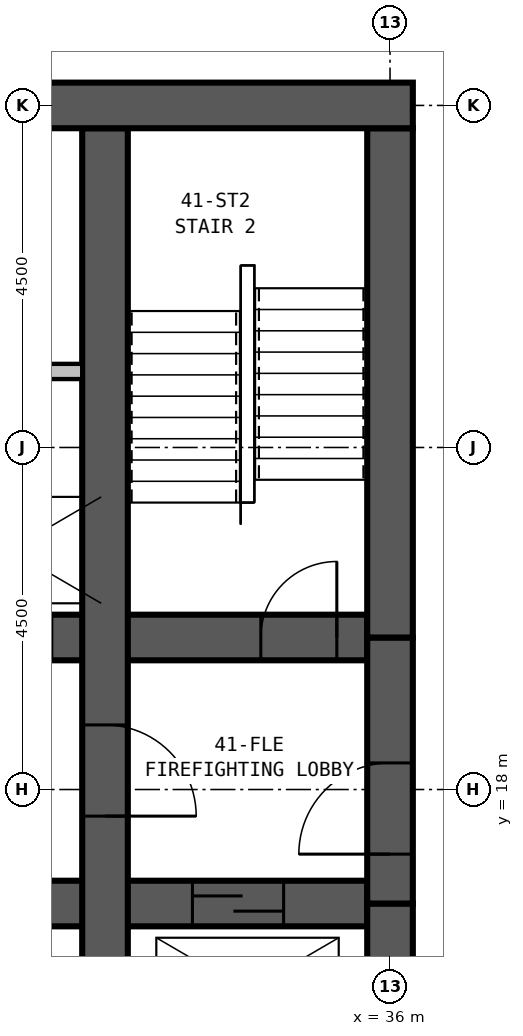
"""IFC4 building model, lengths in metres.
Left out: names, types, materials, properties, quantities, classifications, styles, units other than length and angle.
Written with IfcOpenShell. Run it as: python <this file> out.ifc"""

import sys

from ifc_helpers import new_model, si_unit, direction, frame, frame_2d, origin, place, context, subcontext, project, spatial, rectangle, extrude, element, fill, save


model = new_model("IFC4")
c1 = context("Model", 3, precision=1e-05, world=origin(), true_north=direction((0.0, 1.0)))
c2 = subcontext(c1, "Body", "Model", "MODEL_VIEW")
j1 = project(units=[si_unit("LENGTHUNIT", "METRE"), si_unit("PLANEANGLEUNIT", "RADIAN")], contexts=[c1])
p1 = place(None, origin())
s1 = spatial("IfcSite", under=j1, at=p1, CompositionType="ELEMENT")
p2 = place(p1, origin())
s2 = spatial("IfcBuilding", under=s1, at=p2, CompositionType="ELEMENT")
p3 = place(p2, frame((0.0, 0.0, 162.4)))
s3 = spatial("IfcBuildingStorey", under=s2, at=p3, CompositionType="ELEMENT", Elevation=162.4)
p4 = place(p3, frame((36.3, 27.0, 0.0), z_axis=(0.0, 0.0, 1.0), x_axis=(-1.0, 0.0, 0.0)))
e1 = element("IfcWall", 1, at=p4, inside=s3, PredefinedType="SHEAR", context=c2, shape_type="SweptSolid", body=[
    extrude(rectangle(XDim=23.1, YDim=0.6, at=frame_2d((11.55, 0.0))), origin(), (0.0, 0.0, 1.0), 3.5),
])
p5 = place(p4, frame((17.05, 0.0, 0.0)))
e2 = element("IfcOpeningElement", 2, at=p5, cuts=e1, PredefinedType="OPENING", context=c2, shape_type="SweptSolid", body=[
    extrude(rectangle(XDim=1.0, YDim=2.1, at=frame_2d((0.5, 1.05))), frame((0.0, 0.31, 0.0), z_axis=(0.0, -1.0, 0.0), x_axis=(1.0, 0.0, 0.0)), (0.0, 0.0, 1.0), 0.62),
])
p6 = place(p4, frame((12.05, 0.0, 0.0)))
e3 = element("IfcOpeningElement", 3, at=p6, cuts=e1, PredefinedType="OPENING", context=c2, shape_type="SweptSolid", body=[
    extrude(rectangle(XDim=1.0, YDim=2.1, at=frame_2d((0.5, 1.05))), frame((0.0, 0.31, 0.0), z_axis=(0.0, -1.0, 0.0), x_axis=(1.0, 0.0, 0.0)), (0.0, 0.0, 1.0), 0.62),
])
p7 = place(p4, frame((7.05, 0.0, 0.0)))
e4 = element("IfcOpeningElement", 4, at=p7, cuts=e1, PredefinedType="OPENING", context=c2, shape_type="SweptSolid", body=[
    extrude(rectangle(XDim=1.0, YDim=2.1, at=frame_2d((0.5, 1.05))), frame((0.0, 0.31, 0.0), z_axis=(0.0, -1.0, 0.0), x_axis=(1.0, 0.0, 0.0)), (0.0, 0.0, 1.0), 0.62),
])
p8 = place(p3, frame((32.25, 13.8, 0.0), z_axis=(0.0, 0.0, 1.0), x_axis=(0.0, 1.0, 0.0)))
e5 = element("IfcWall", 5, at=p8, inside=s3, PredefinedType="SHEAR", context=c2, shape_type="SweptSolid", body=[
    extrude(rectangle(XDim=12.9, YDim=0.6, at=frame_2d((6.45, 0.0))), origin(), (0.0, 0.0, 1.0), 3.5),
])
p9 = place(p8, frame((5.05, 0.0, 0.0), z_axis=(0.0, 0.0, 1.0), x_axis=(-1.0, 0.0, 0.0)))
e6 = element("IfcOpeningElement", 6, at=p9, cuts=e5, PredefinedType="OPENING", context=c2, shape_type="SweptSolid", body=[
    extrude(rectangle(XDim=1.2, YDim=2.1, at=frame_2d((0.6, 1.05))), frame((0.0, 0.31, 0.0), z_axis=(0.0, -1.0, 0.0), x_axis=(1.0, 0.0, 0.0)), (0.0, 0.0, 1.0), 0.62),
])
p10 = place(p3, frame((13.8, 16.5, 0.0), z_axis=(0.0, 0.0, 1.0), x_axis=(1.0, 0.0, 0.0)))
e7 = element("IfcWall", 7, at=p10, inside=s3, PredefinedType="SHEAR", context=c2, shape_type="SweptSolid", body=[
    extrude(rectangle(XDim=21.9, YDim=0.6, at=frame_2d((10.95, 0.0))), origin(), (0.0, 0.0, 1.0), 3.5),
])
p11 = place(p10, frame((5.75, 0.0, 0.0), z_axis=(0.0, 0.0, 1.0), x_axis=(-1.0, 0.0, 0.0)))
e8 = element("IfcOpeningElement", 8, at=p11, cuts=e7, PredefinedType="OPENING", context=c2, shape_type="SweptSolid", body=[
    extrude(rectangle(XDim=1.0, YDim=2.1, at=frame_2d((0.5, 1.05))), frame((0.0, 0.31, 0.0), z_axis=(0.0, -1.0, 0.0), x_axis=(1.0, 0.0, 0.0)), (0.0, 0.0, 1.0), 0.62),
])
p12 = place(p10, frame((10.2, 0.0, 0.0), z_axis=(0.0, 0.0, 1.0), x_axis=(-1.0, 0.0, 0.0)))
e9 = element("IfcOpeningElement", 9, at=p12, cuts=e7, PredefinedType="OPENING", context=c2, shape_type="SweptSolid", body=[
    extrude(rectangle(XDim=1.0, YDim=2.1, at=frame_2d((0.5, 1.05))), frame((0.0, 0.31, 0.0), z_axis=(0.0, -1.0, 0.0), x_axis=(1.0, 0.0, 0.0)), (0.0, 0.0, 1.0), 0.62),
])
p13 = place(p10, frame((12.7, 0.0, 0.0), z_axis=(0.0, 0.0, 1.0), x_axis=(-1.0, 0.0, 0.0)))
e10 = element("IfcOpeningElement", 10, at=p13, cuts=e7, PredefinedType="OPENING", context=c2, shape_type="SweptSolid", body=[
    extrude(rectangle(XDim=1.0, YDim=2.1, at=frame_2d((0.5, 1.05))), frame((0.0, 0.31, 0.0), z_axis=(0.0, -1.0, 0.0), x_axis=(1.0, 0.0, 0.0)), (0.0, 0.0, 1.0), 0.62),
])
p14 = place(p10, frame((17.15, 0.0, 0.0), z_axis=(0.0, 0.0, 1.0), x_axis=(-1.0, 0.0, 0.0)))
e11 = element("IfcOpeningElement", 11, at=p14, cuts=e7, PredefinedType="OPENING", context=c2, shape_type="SweptSolid", body=[
    extrude(rectangle(XDim=1.0, YDim=2.1, at=frame_2d((0.5, 1.05))), frame((0.0, 0.31, 0.0), z_axis=(0.0, -1.0, 0.0), x_axis=(1.0, 0.0, 0.0)), (0.0, 0.0, 1.0), 0.62),
])
p15 = place(p10, frame((0.6, 0.0, 0.0)))
e12 = element("IfcOpeningElement", 12, at=p15, cuts=e7, PredefinedType="OPENING", context=c2, shape_type="SweptSolid", body=[
    extrude(rectangle(XDim=1.2, YDim=2.1, at=frame_2d((0.6, 1.05))), frame((0.0, 0.31, 0.0), z_axis=(0.0, -1.0, 0.0), x_axis=(1.0, 0.0, 0.0)), (0.0, 0.0, 1.0), 0.62),
])
p16 = place(p10, frame((19.6, 0.0, 0.0)))
e13 = element("IfcOpeningElement", 13, at=p16, cuts=e7, PredefinedType="OPENING", context=c2, shape_type="SweptSolid", body=[
    extrude(rectangle(XDim=1.2, YDim=2.1, at=frame_2d((0.6, 1.05))), frame((0.0, 0.31, 0.0), z_axis=(0.0, -1.0, 0.0), x_axis=(1.0, 0.0, 0.0)), (0.0, 0.0, 1.0), 0.62),
])
p17 = place(p3, frame((13.8, 20.0, 0.0), z_axis=(0.0, 0.0, 1.0), x_axis=(1.0, 0.0, 0.0)))
e14 = element("IfcWall", 14, at=p17, inside=s3, PredefinedType="SHEAR", context=c2, shape_type="SweptSolid", body=[
    extrude(rectangle(XDim=21.9, YDim=0.6, at=frame_2d((10.95, 0.0))), origin(), (0.0, 0.0, 1.0), 3.5),
])
p18 = place(p17, frame((0.5, 0.0, 0.0)))
e15 = element("IfcOpeningElement", 15, at=p18, cuts=e14, PredefinedType="OPENING", context=c2, shape_type="SweptSolid", body=[
    extrude(rectangle(XDim=1.0, YDim=2.1, at=frame_2d((0.5, 1.05))), frame((0.0, 0.31, 0.0), z_axis=(0.0, -1.0, 0.0), x_axis=(1.0, 0.0, 0.0)), (0.0, 0.0, 1.0), 0.62),
])
p19 = place(p17, frame((20.5, 0.0, 0.0)))
e16 = element("IfcOpeningElement", 16, at=p19, cuts=e14, PredefinedType="OPENING", context=c2, shape_type="SweptSolid", body=[
    extrude(rectangle(XDim=1.0, YDim=2.1, at=frame_2d((0.5, 1.05))), frame((0.0, 0.31, 0.0), z_axis=(0.0, -1.0, 0.0), x_axis=(1.0, 0.0, 0.0)), (0.0, 0.0, 1.0), 0.62),
])
p20 = place(p17, frame((9.15, 0.0, 0.0)))
e17 = element("IfcOpeningElement", 17, at=p20, cuts=e14, PredefinedType="OPENING", context=c2, shape_type="SweptSolid", body=[
    extrude(rectangle(XDim=1.1, YDim=2.1, at=frame_2d((0.55, 1.05))), frame((0.0, 0.31, 0.0), z_axis=(0.0, -1.0, 0.0), x_axis=(1.0, 0.0, 0.0)), (0.0, 0.0, 1.0), 0.62),
])
p21 = place(p17, frame((11.65, 0.0, 0.0)))
e18 = element("IfcOpeningElement", 18, at=p21, cuts=e14, PredefinedType="OPENING", context=c2, shape_type="SweptSolid", body=[
    extrude(rectangle(XDim=1.1, YDim=2.1, at=frame_2d((0.55, 1.05))), frame((0.0, 0.31, 0.0), z_axis=(0.0, -1.0, 0.0), x_axis=(1.0, 0.0, 0.0)), (0.0, 0.0, 1.0), 0.62),
])
p22 = place(p17, frame((14.15, 0.0, 0.0)))
e19 = element("IfcOpeningElement", 19, at=p22, cuts=e14, PredefinedType="OPENING", context=c2, shape_type="SweptSolid", body=[
    extrude(rectangle(XDim=1.1, YDim=2.1, at=frame_2d((0.55, 1.05))), frame((0.0, 0.31, 0.0), z_axis=(0.0, -1.0, 0.0), x_axis=(1.0, 0.0, 0.0)), (0.0, 0.0, 1.0), 0.62),
])
p23 = place(p17, frame((16.65, 0.0, 0.0)))
e20 = element("IfcOpeningElement", 20, at=p23, cuts=e14, PredefinedType="OPENING", context=c2, shape_type="SweptSolid", body=[
    extrude(rectangle(XDim=1.1, YDim=2.1, at=frame_2d((0.55, 1.05))), frame((0.0, 0.31, 0.0), z_axis=(0.0, -1.0, 0.0), x_axis=(1.0, 0.0, 0.0)), (0.0, 0.0, 1.0), 0.62),
])
p24 = place(p17, frame((4.75, 0.0, 0.0)))
e21 = element("IfcOpeningElement", 21, at=p24, cuts=e14, PredefinedType="OPENING", context=c2, shape_type="SweptSolid", body=[
    extrude(rectangle(XDim=1.0, YDim=2.1, at=frame_2d((0.5, 1.05))), frame((0.0, 0.31, 0.0), z_axis=(0.0, -1.0, 0.0), x_axis=(1.0, 0.0, 0.0)), (0.0, 0.0, 1.0), 0.62),
])
p25 = place(p17, frame((6.7, 0.0, 0.0)))
e22 = element("IfcOpeningElement", 22, at=p25, cuts=e14, PredefinedType="OPENING", context=c2, shape_type="SweptSolid", body=[
    extrude(rectangle(XDim=1.0, YDim=2.1, at=frame_2d((0.5, 1.05))), frame((0.0, 0.31, 0.0), z_axis=(0.0, -1.0, 0.0), x_axis=(1.0, 0.0, 0.0)), (0.0, 0.0, 1.0), 0.62),
])
p26 = place(p3, frame((36.0, 13.8, 0.0), z_axis=(0.0, 0.0, 1.0), x_axis=(0.0, 1.0, 0.0)))
e23 = element("IfcWall", 23, at=p26, inside=s3, PredefinedType="SHEAR", context=c2, shape_type="SweptSolid", body=[
    extrude(rectangle(XDim=2.7, YDim=0.6, at=frame_2d((1.35, 0.0))), origin(), (0.0, 0.0, 1.0), 3.5),
])
p27 = place(p3, frame((36.0, 16.5, 0.0), z_axis=(0.0, 0.0, 1.0), x_axis=(0.0, 1.0, 0.0)))
e24 = element("IfcWall", 24, at=p27, inside=s3, PredefinedType="SHEAR", context=c2, shape_type="SweptSolid", body=[
    extrude(rectangle(XDim=3.5, YDim=0.6, at=frame_2d((1.75, 0.0))), origin(), (0.0, 0.0, 1.0), 3.5),
])
p28 = place(p27, frame((0.65, 0.0, 0.0)))
e25 = element("IfcOpeningElement", 25, at=p28, cuts=e24, PredefinedType="OPENING", context=c2, shape_type="SweptSolid", body=[
    extrude(rectangle(XDim=1.2, YDim=2.1, at=frame_2d((0.6, 1.05))), frame((0.0, 0.31, 0.0), z_axis=(0.0, -1.0, 0.0), x_axis=(1.0, 0.0, 0.0)), (0.0, 0.0, 1.0), 0.62),
])
p29 = place(p3, frame((36.0, 20.0, 0.0), z_axis=(0.0, 0.0, 1.0), x_axis=(0.0, 1.0, 0.0)))
e26 = element("IfcWall", 26, at=p29, inside=s3, PredefinedType="SHEAR", context=c2, shape_type="SweptSolid", body=[
    extrude(rectangle(XDim=6.7, YDim=0.6, at=frame_2d((3.35, 0.0))), origin(), (0.0, 0.0, 1.0), 3.5),
])
p30 = place(p3, frame((17.55, 23.5, 0.0), z_axis=(0.0, 0.0, 1.0), x_axis=(1.0, 0.0, 0.0)))
e27 = element("IfcWall", 27, at=p30, inside=s3, PredefinedType="PARTITIONING", context=c2, shape_type="SweptSolid", body=[
    extrude(rectangle(XDim=14.4, YDim=0.2, at=frame_2d((7.2, 0.0))), origin(), (0.0, 0.0, 1.0), 3.25),
])
p31 = place(p28, origin())
e28 = element("IfcDoor", 28, at=p31, inside=s3, OperationType="SINGLE_SWING_LEFT", PredefinedType="DOOR", context=c2, shape_type="SweptSolid", body=[
    extrude(rectangle(XDim=1.2, YDim=2.1, at=frame_2d((0.6, 1.05))), frame((0.0, 0.3, 0.0), z_axis=(0.0, -1.0, 0.0), x_axis=(1.0, 0.0, 0.0)), (0.0, 0.0, 1.0), 0.6),
])
fill(e25, e28)
p32 = place(p9, origin())
e29 = element("IfcDoor", 29, at=p32, inside=s3, OperationType="SINGLE_SWING_RIGHT", PredefinedType="DOOR", context=c2, shape_type="SweptSolid", body=[
    extrude(rectangle(XDim=1.2, YDim=2.1, at=frame_2d((0.6, 1.05))), frame((0.0, 0.3, 0.0), z_axis=(0.0, -1.0, 0.0), x_axis=(1.0, 0.0, 0.0)), (0.0, 0.0, 1.0), 0.6),
])
fill(e6, e29)
p33 = place(p19, origin())
e30 = element("IfcDoor", 30, at=p33, inside=s3, OperationType="SINGLE_SWING_RIGHT", PredefinedType="DOOR", context=c2, shape_type="SweptSolid", body=[
    extrude(rectangle(XDim=1.0, YDim=2.1, at=frame_2d((0.5, 1.05))), frame((0.0, 0.3, 0.0), z_axis=(0.0, -1.0, 0.0), x_axis=(1.0, 0.0, 0.0)), (0.0, 0.0, 1.0), 0.6),
])
fill(e16, e30)
p34 = place(p16, origin())
e31 = element("IfcDoor", 31, at=p34, inside=s3, OperationType="SLIDING_TO_LEFT", PredefinedType="DOOR", context=c2, shape_type="SweptSolid", body=[
    extrude(rectangle(XDim=1.2, YDim=2.1, at=frame_2d((0.6, 1.05))), frame((0.0, 0.3, 0.0), z_axis=(0.0, -1.0, 0.0), x_axis=(1.0, 0.0, 0.0)), (0.0, 0.0, 1.0), 0.6),
])
fill(e13, e31)
save(model, sys.argv[1])
